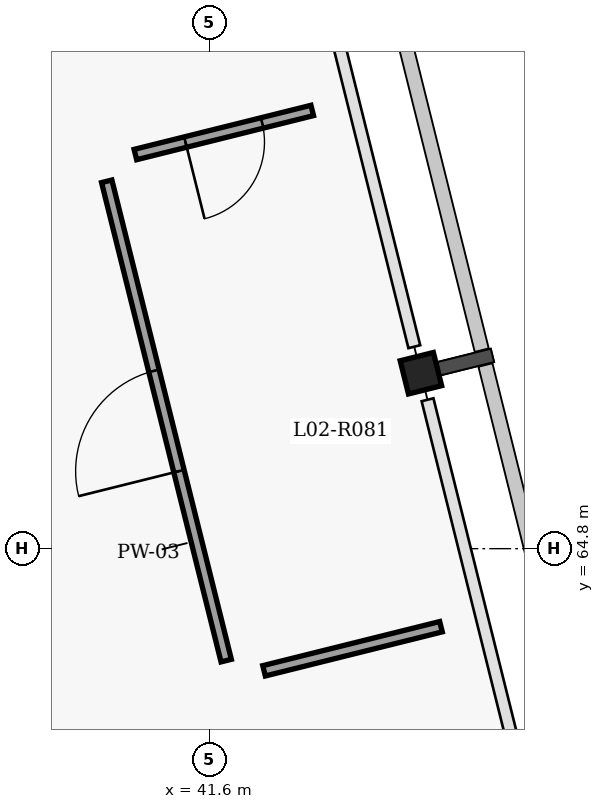
"""IFC4 building model, lengths in metres.
Left out: names, types, materials, properties, quantities, classifications, styles, units other than length and angle.
Written with IfcOpenShell. Run it as: python <this file> out.ifc"""

import sys

from ifc_helpers import new_model, si_unit, direction, frame, frame_2d, origin, origin_2d, place, context, subcontext, project, spatial, rectangle, extrude, element, fill, save


model = new_model("IFC4")
c1 = context("Model", 3, precision=1e-05, world=origin(), true_north=direction((0.0, 1.0)))
c2 = subcontext(c1, "Body", "Model", "MODEL_VIEW")
j1 = project(units=[si_unit("LENGTHUNIT", "METRE"), si_unit("PLANEANGLEUNIT", "RADIAN")], contexts=[c1])
p1 = place(None, origin())
s1 = spatial("IfcSite", under=j1, at=p1, CompositionType="ELEMENT")
p2 = place(p1, origin())
s2 = spatial("IfcBuilding", under=s1, at=p2, CompositionType="ELEMENT")
p3 = place(p2, frame((0.0, 0.0, 9.0)))
s3 = spatial("IfcBuildingStorey", under=s2, at=p3, CompositionType="ELEMENT", Elevation=9.0)
p4 = place(p3, frame((44.381, 67.108, 0.0), z_axis=(0.0, 0.0, 1.0), x_axis=(0.970295726276, 0.2419218956, 0.0)))
e1 = element("IfcColumn", 1, at=p4, inside=s3, PredefinedType="COLUMN", context=c2, shape_type="SweptSolid", body=[
    extrude(rectangle(XDim=0.45, YDim=0.45, at=origin_2d()), origin(), (0.0, 0.0, 1.0), 3.9),
])
p5 = place(p3, frame((41.819, 63.327, 0.0), z_axis=(0.0, 0.0, 1.0), x_axis=(-0.241881495727, 0.970305798202, 0.0)))
e2 = element("IfcWall", 2, at=p5, inside=s3, PredefinedType="PARTITIONING", context=c2, shape_type="SweptSolid", body=[
    extrude(rectangle(XDim=6.499, YDim=0.14, at=frame_2d((3.25, 0.0))), origin(), (0.0, 0.0, 1.0), 3.645),
])
p6 = place(p5, frame((2.569, 0.0, 0.0)))
e3 = element("IfcOpeningElement", 3, at=p6, cuts=e2, PredefinedType="OPENING", context=c2, shape_type="SweptSolid", body=[
    extrude(rectangle(XDim=1.36, YDim=2.22, at=frame_2d((0.68, 1.11))), frame((0.0, 0.08, 0.0), z_axis=(0.0, -1.0, 0.0), x_axis=(1.0, 0.0, 0.0)), (0.0, 0.0, 1.0), 0.16),
])
p7 = place(p3, frame((42.317, 63.193, 0.0), z_axis=(0.0, 0.0, 1.0), x_axis=(0.970357603284, 0.24167358513, 0.0)))
e4 = element("IfcWall", 4, at=p7, inside=s3, PredefinedType="PARTITIONING", context=c2, shape_type="SweptSolid", body=[
    extrude(rectangle(XDim=2.399, YDim=0.14, at=frame_2d((1.2, 0.0))), origin(), (0.0, 0.0, 1.0), 3.645),
])
p8 = place(p3, frame((40.624, 69.985, 0.0), z_axis=(0.0, 0.0, 1.0), x_axis=(0.970327865017, 0.241792957656, 0.0)))
e5 = element("IfcWall", 5, at=p8, inside=s3, PredefinedType="PARTITIONING", context=c2, shape_type="SweptSolid", body=[
    extrude(rectangle(XDim=2.398, YDim=0.14, at=frame_2d((1.199, 0.0))), origin(), (0.0, 0.0, 1.0), 3.645),
])
p9 = place(p8, frame((0.679, 0.0, 0.0)))
e6 = element("IfcOpeningElement", 6, at=p9, cuts=e5, PredefinedType="OPENING", context=c2, shape_type="SweptSolid", body=[
    extrude(rectangle(XDim=1.04, YDim=2.08, at=frame_2d((0.52, 1.04))), frame((0.0, 0.08, 0.0), z_axis=(0.0, -1.0, 0.0), x_axis=(1.0, 0.0, 0.0)), (0.0, 0.0, 1.0), 0.16),
])
p10 = place(p6, origin())
e7 = element("IfcDoor", 7, at=p10, inside=s3, OperationType="DOUBLE_DOOR_SINGLE_SWING", PredefinedType="DOOR", context=c2, shape_type="SweptSolid", body=[
    extrude(rectangle(XDim=1.36, YDim=2.22, at=frame_2d((0.68, 1.11))), frame((0.0, 0.025, 0.0), z_axis=(0.0, -1.0, 0.0), x_axis=(1.0, 0.0, 0.0)), (0.0, 0.0, 1.0), 0.05),
])
fill(e3, e7)
p11 = place(p9, origin())
e8 = element("IfcDoor", 8, at=p11, inside=s3, OperationType="SINGLE_SWING_RIGHT", PredefinedType="DOOR", context=c2, shape_type="SweptSolid", body=[
    extrude(rectangle(XDim=1.04, YDim=2.08, at=frame_2d((0.52, 1.04))), frame((0.0, 0.025, 0.0), z_axis=(0.0, -1.0, 0.0), x_axis=(1.0, 0.0, 0.0)), (0.0, 0.0, 1.0), 0.05),
])
fill(e6, e8)
save(model, sys.argv[1])
